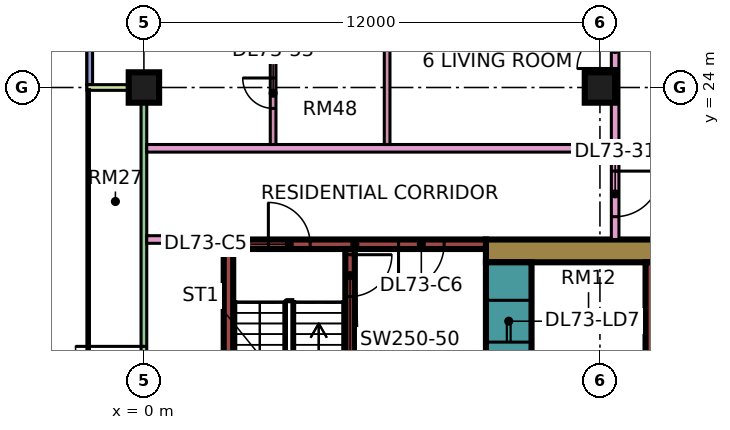
"""IFC4 building model, lengths in metres.
Left out: names, types, materials, properties, quantities, classifications, styles, units other than length and angle.
Written with IfcOpenShell. Run it as: python <this file> out.ifc"""

import sys

from ifc_helpers import new_model, si_unit, direction, frame, frame_2d, origin, origin_2d, place, context, subcontext, project, spatial, rectangle, extrude, element, fill, save


model = new_model("IFC4")
c1 = context("Model", 3, precision=1e-05, world=origin(), true_north=direction((0.0, 1.0)))
c2 = subcontext(c1, "Body", "Model", "MODEL_VIEW")
j1 = project(units=[si_unit("LENGTHUNIT", "METRE"), si_unit("PLANEANGLEUNIT", "RADIAN")], contexts=[c1])
p1 = place(None, origin())
s1 = spatial("IfcSite", under=j1, at=p1, CompositionType="ELEMENT")
p2 = place(p1, origin())
s2 = spatial("IfcBuilding", under=s1, at=p2, CompositionType="ELEMENT")
p3 = place(p2, frame((0.0, 0.0, 310.9)))
s3 = spatial("IfcBuildingStorey", under=s2, at=p3, CompositionType="ELEMENT", Elevation=310.9)
for number, where, z_axis, x_axis in (
    (1, (0.0, 24.0, 0.0), (0.0, 0.0, 1.0), (1.0, 0.0, 0.0)),
    (2, (12.0, 24.0, 0.0), (0.0, 0.0, 1.0), (1.0, 0.0, 0.0)),
):
    element("IfcColumn", number, at=place(p3, frame(where, z_axis=z_axis, x_axis=x_axis)), inside=s3, PredefinedType="COLUMN", context=c2, shape_type="SweptSolid", body=[
        extrude(rectangle(XDim=0.8, YDim=0.8, at=origin_2d()), origin(), (0.0, 0.0, 1.0), 3.75),
    ])
p4 = place(p3, frame((9.0, 19.7, 0.0), z_axis=(0.0, 0.0, 1.0), x_axis=(1.0, 0.0, 0.0)))
e3 = element("IfcWall", 3, at=p4, inside=s3, PredefinedType="SHEAR", context=c2, shape_type="SweptSolid", body=[
    extrude(rectangle(XDim=25.0, YDim=0.6, at=frame_2d((12.5, 0.0))), origin(), (0.0, 0.0, 1.0), 3.75),
])
p5 = place(p4, frame((19.1, 0.0, 0.0)))
e4 = element("IfcOpeningElement", 4, at=p5, cuts=e3, PredefinedType="OPENING", context=c2, shape_type="SweptSolid", body=[
    extrude(rectangle(XDim=1.8, YDim=2.4, at=frame_2d((0.9, 1.2))), frame((0.0, 0.31, 0.0), z_axis=(0.0, -1.0, 0.0), x_axis=(1.0, 0.0, 0.0)), (0.0, 0.0, 1.0), 0.62),
])
p6 = place(p3, frame((9.6, 7.6, 0.0), z_axis=(0.0, 0.0, 1.0), x_axis=(0.0, 1.0, 0.0)))
e5 = element("IfcWall", 5, at=p6, inside=s3, PredefinedType="SHEAR", context=c2, shape_type="SweptSolid", body=[
    extrude(rectangle(XDim=11.8, YDim=1.2, at=frame_2d((5.9, 0.0))), origin(), (0.0, 0.0, 1.0), 3.75),
])
p7 = place(p6, frame((4.275, 0.0, 0.0)))
e6 = element("IfcOpeningElement", 6, at=p7, cuts=e5, PredefinedType="OPENING", context=c2, shape_type="SweptSolid", body=[
    extrude(rectangle(XDim=1.1, YDim=2.2, at=frame_2d((0.55, 1.1))), frame((0.0, 0.61, 0.0), z_axis=(0.0, -1.0, 0.0), x_axis=(1.0, 0.0, 0.0)), (0.0, 0.0, 1.0), 1.22),
])
p8 = place(p6, frame((6.775, 0.0, 0.0)))
e7 = element("IfcOpeningElement", 7, at=p8, cuts=e5, PredefinedType="OPENING", context=c2, shape_type="SweptSolid", body=[
    extrude(rectangle(XDim=1.1, YDim=2.2, at=frame_2d((0.55, 1.1))), frame((0.0, 0.61, 0.0), z_axis=(0.0, -1.0, 0.0), x_axis=(1.0, 0.0, 0.0)), (0.0, 0.0, 1.0), 1.22),
])
p9 = place(p6, frame((9.7, 0.0, 0.0)))
e8 = element("IfcOpeningElement", 8, at=p9, cuts=e5, PredefinedType="OPENING", context=c2, shape_type="SweptSolid", body=[
    extrude(rectangle(XDim=1.1, YDim=2.2, at=frame_2d((0.55, 1.1))), frame((0.0, 0.61, 0.0), z_axis=(0.0, -1.0, 0.0), x_axis=(1.0, 0.0, 0.0)), (0.0, 0.0, 1.0), 1.22),
])
p10 = place(p6, frame((1.95, 0.0, 0.0)))
e9 = element("IfcOpeningElement", 9, at=p10, cuts=e5, PredefinedType="OPENING", context=c2, shape_type="SweptSolid", body=[
    extrude(rectangle(XDim=0.9, YDim=2.1, at=frame_2d((0.45, 1.05))), frame((0.0, 0.61, 0.0), z_axis=(0.0, -1.0, 0.0), x_axis=(1.0, 0.0, 0.0)), (0.0, 0.0, 1.0), 1.22),
])
p11 = place(p3, frame((13.325, 7.6, 0.0), z_axis=(0.0, 0.0, 1.0), x_axis=(0.0, 1.0, 0.0)))
e10 = element("IfcWall", 10, at=p11, inside=s3, PredefinedType="SHEAR", context=c2, shape_type="SweptSolid", body=[
    extrude(rectangle(XDim=11.8, YDim=0.25, at=frame_2d((5.9, 0.0))), origin(), (0.0, 0.0, 1.0), 3.75),
])
p12 = place(p3, frame((2.1, 19.875, 0.0), z_axis=(0.0, 0.0, 1.0), x_axis=(1.0, 0.0, 0.0)))
e11 = element("IfcWall", 11, at=p12, inside=s3, PredefinedType="SHEAR", context=c2, shape_type="SweptSolid", body=[
    extrude(rectangle(XDim=6.9, YDim=0.25, at=frame_2d((3.45, 0.0))), origin(), (0.0, 0.0, 1.0), 3.75),
])
p13 = place(p12, frame((1.175, 0.0, 0.0)))
e12 = element("IfcOpeningElement", 12, at=p13, cuts=e11, PredefinedType="OPENING", context=c2, shape_type="SweptSolid", body=[
    extrude(rectangle(XDim=1.1, YDim=2.2, at=frame_2d((0.55, 1.1))), frame((0.0, 0.135, 0.0), z_axis=(0.0, -1.0, 0.0), x_axis=(1.0, 0.0, 0.0)), (0.0, 0.0, 1.0), 0.27),
])
p14 = place(p12, frame((4.6, 0.0, 0.0)))
e13 = element("IfcOpeningElement", 13, at=p14, cuts=e11, PredefinedType="OPENING", context=c2, shape_type="SweptSolid", body=[
    extrude(rectangle(XDim=1.2, YDim=2.2, at=frame_2d((0.6, 1.1))), frame((0.0, 0.135, 0.0), z_axis=(0.0, -1.0, 0.0), x_axis=(1.0, 0.0, 0.0)), (0.0, 0.0, 1.0), 0.27),
])
p15 = place(p3, frame((2.225, 13.25, 0.0), z_axis=(0.0, 0.0, 1.0), x_axis=(0.0, 1.0, 0.0)))
e14 = element("IfcWall", 14, at=p15, inside=s3, PredefinedType="SHEAR", context=c2, shape_type="SweptSolid", body=[
    extrude(rectangle(XDim=6.5, YDim=0.25, at=frame_2d((3.25, 0.0))), origin(), (0.0, 0.0, 1.0), 3.75),
])
p16 = place(p3, frame((5.425, 13.25, 0.0), z_axis=(0.0, 0.0, 1.0), x_axis=(0.0, 1.0, 0.0)))
e15 = element("IfcWall", 15, at=p16, inside=s3, PredefinedType="SHEAR", context=c2, shape_type="SweptSolid", body=[
    extrude(rectangle(XDim=6.5, YDim=0.25, at=frame_2d((3.25, 0.0))), origin(), (0.0, 0.0, 1.0), 3.75),
])
p17 = place(p16, frame((5.25, 0.0, 0.0)))
e16 = element("IfcOpeningElement", 16, at=p17, cuts=e15, PredefinedType="OPENING", context=c2, shape_type="SweptSolid", body=[
    extrude(rectangle(XDim=1.1, YDim=2.2, at=frame_2d((0.55, 1.1))), frame((0.0, 0.135, 0.0), z_axis=(0.0, -1.0, 0.0), x_axis=(1.0, 0.0, 0.0)), (0.0, 0.0, 1.0), 0.27),
])
p18 = place(p3, frame((-1.425, 35.925, 0.0), z_axis=(0.0, 0.0, 1.0), x_axis=(0.0, -1.0, 0.0)))
e17 = element("IfcWall", 17, at=p18, inside=s3, PredefinedType="SOLIDWALL", context=c2, shape_type="SweptSolid", body=[
    extrude(rectangle(XDim=11.85, YDim=0.15, at=frame_2d((5.925, 0.0))), origin(), (0.0, 0.0, 1.0), 3.35),
])
p19 = place(p18, frame((0.562, 0.0, 0.45)))
e18 = element("IfcOpeningElement", 18, at=p19, cuts=e17, PredefinedType="OPENING", context=c2, shape_type="SweptSolid", body=[
    extrude(rectangle(XDim=1.8, YDim=2.4, at=frame_2d((0.9, 1.2))), frame((0.0, 0.085, 0.0), z_axis=(0.0, -1.0, 0.0), x_axis=(1.0, 0.0, 0.0)), (0.0, 0.0, 1.0), 0.17),
])
p20 = place(p18, frame((3.525, 0.0, 0.45)))
e19 = element("IfcOpeningElement", 19, at=p20, cuts=e17, PredefinedType="OPENING", context=c2, shape_type="SweptSolid", body=[
    extrude(rectangle(XDim=1.8, YDim=2.4, at=frame_2d((0.9, 1.2))), frame((0.0, 0.085, 0.0), z_axis=(0.0, -1.0, 0.0), x_axis=(1.0, 0.0, 0.0)), (0.0, 0.0, 1.0), 0.17),
])
p21 = place(p18, frame((7.387, 0.0, 0.45)))
e20 = element("IfcOpeningElement", 20, at=p21, cuts=e17, PredefinedType="OPENING", context=c2, shape_type="SweptSolid", body=[
    extrude(rectangle(XDim=3.0, YDim=2.4, at=frame_2d((1.5, 1.2))), frame((0.0, 0.085, 0.0), z_axis=(0.0, -1.0, 0.0), x_axis=(1.0, 0.0, 0.0)), (0.0, 0.0, 1.0), 0.17),
])
p22 = place(p3, frame((0.0, 23.925, 0.0), z_axis=(0.0, 0.0, 1.0), x_axis=(0.0, -1.0, 0.0)))
e21 = element("IfcWall", 21, at=p22, inside=s3, PredefinedType="SOLIDWALL", context=c2, shape_type="SweptSolid", body=[
    extrude(rectangle(XDim=11.35, YDim=0.15, at=frame_2d((5.675, 0.0))), origin(), (0.0, 0.0, 1.0), 3.35),
])
p23 = place(p22, frame((6.738, 0.0, 0.0)))
e22 = element("IfcOpeningElement", 22, at=p23, cuts=e21, PredefinedType="OPENING", context=c2, shape_type="SweptSolid", body=[
    extrude(rectangle(XDim=1.8, YDim=2.4, at=frame_2d((0.9, 1.2))), frame((0.0, 0.085, 0.0), z_axis=(0.0, -1.0, 0.0), x_axis=(1.0, 0.0, 0.0)), (0.0, 0.0, 1.0), 0.17),
])
p24 = place(p3, frame((-1.5, 24.0, 0.0), z_axis=(0.0, 0.0, 1.0), x_axis=(1.0, 0.0, 0.0)))
e23 = element("IfcWall", 23, at=p24, inside=s3, PredefinedType="SOLIDWALL", context=c2, shape_type="SweptSolid", body=[
    extrude(rectangle(XDim=1.5, YDim=0.15, at=frame_2d((0.75, 0.0))), origin(), (0.0, 0.0, 1.0), 3.35),
])
p25 = place(p3, frame((0.074, 20.0, 0.0), z_axis=(0.0, 0.0, 1.0), x_axis=(1.0, 0.0, 0.0)))
e24 = element("IfcWall", 24, at=p25, inside=s3, PredefinedType="PARTITIONING", context=c2, shape_type="SweptSolid", body=[
    extrude(rectangle(XDim=2.026, YDim=0.2, at=frame_2d((1.013, 0.0))), origin(), (0.0, 0.0, 1.0), 3.35),
])
p26 = place(p3, frame((0.074, 22.4, 0.0), z_axis=(0.0, 0.0, 1.0), x_axis=(1.0, 0.0, 0.0)))
e25 = element("IfcWall", 25, at=p26, inside=s3, PredefinedType="PARTITIONING", context=c2, shape_type="SweptSolid", body=[
    extrude(rectangle(XDim=12.226, YDim=0.2, at=frame_2d((6.113, 0.0))), origin(), (0.0, 0.0, 1.0), 3.35),
])
p27 = place(p3, frame((3.4, 22.5, 0.0), z_axis=(0.0, 0.0, 1.0), x_axis=(0.0, 1.0, 0.0)))
e26 = element("IfcWall", 26, at=p27, inside=s3, PredefinedType="PARTITIONING", context=c2, shape_type="SweptSolid", body=[
    extrude(rectangle(XDim=2.825, YDim=0.15, at=frame_2d((1.413, 0.0))), origin(), (0.0, 0.0, 1.0), 3.35),
])
p28 = place(p27, frame((0.95, 0.0, 0.0)))
e27 = element("IfcOpeningElement", 27, at=p28, cuts=e26, PredefinedType="OPENING", context=c2, shape_type="SweptSolid", body=[
    extrude(rectangle(XDim=0.8, YDim=2.1, at=frame_2d((0.4, 1.05))), frame((0.0, 0.085, 0.0), z_axis=(0.0, -1.0, 0.0), x_axis=(1.0, 0.0, 0.0)), (0.0, 0.0, 1.0), 0.17),
])
p29 = place(p3, frame((6.4, 22.5, 0.0), z_axis=(0.0, 0.0, 1.0), x_axis=(0.0, 1.0, 0.0)))
e28 = element("IfcWall", 28, at=p29, inside=s3, PredefinedType="PARTITIONING", context=c2, shape_type="SweptSolid", body=[
    extrude(rectangle(XDim=7.55, YDim=0.15, at=frame_2d((3.775, 0.0))), origin(), (0.0, 0.0, 1.0), 3.35),
])
p30 = place(p3, frame((12.4, 20.0, 0.0), z_axis=(0.0, 0.0, 1.0), x_axis=(0.0, 1.0, 0.0)))
e29 = element("IfcWall", 29, at=p30, inside=s3, PredefinedType="PARTITIONING", context=c2, shape_type="SweptSolid", body=[
    extrude(rectangle(XDim=33.926, YDim=0.2, at=frame_2d((16.963, 0.0))), origin(), (0.0, 0.0, 1.0), 3.35),
])
p31 = place(p30, frame((31.8, 0.0, 0.0)))
e30 = element("IfcOpeningElement", 30, at=p31, cuts=e29, PredefinedType="OPENING", context=c2, shape_type="SweptSolid", body=[
    extrude(rectangle(XDim=1.0, YDim=2.1, at=frame_2d((0.5, 1.05))), frame((0.0, 0.11, 0.0), z_axis=(0.0, -1.0, 0.0), x_axis=(1.0, 0.0, 0.0)), (0.0, 0.0, 1.0), 0.22),
])
p32 = place(p30, frame((0.6, 0.0, 0.0)))
e31 = element("IfcOpeningElement", 31, at=p32, cuts=e29, PredefinedType="OPENING", context=c2, shape_type="SweptSolid", body=[
    extrude(rectangle(XDim=1.2, YDim=2.1, at=frame_2d((0.6, 1.05))), frame((0.0, 0.11, 0.0), z_axis=(0.0, -1.0, 0.0), x_axis=(1.0, 0.0, 0.0)), (0.0, 0.0, 1.0), 0.22),
])
p33 = place(p30, frame((4.5, 0.0, 0.0)))
e32 = element("IfcOpeningElement", 32, at=p33, cuts=e29, PredefinedType="OPENING", context=c2, shape_type="SweptSolid", body=[
    extrude(rectangle(XDim=1.0, YDim=2.1, at=frame_2d((0.5, 1.05))), frame((0.0, 0.11, 0.0), z_axis=(0.0, -1.0, 0.0), x_axis=(1.0, 0.0, 0.0)), (0.0, 0.0, 1.0), 0.22),
])
p34 = place(p23, frame((1.8, 0.0, 0.0), z_axis=(0.0, 0.0, 1.0), x_axis=(-1.0, 0.0, 0.0)))
e33 = element("IfcDoor", 33, at=p34, inside=s3, OperationType="DOUBLE_DOOR_SINGLE_SWING", PredefinedType="DOOR", context=c2, shape_type="SweptSolid", body=[
    extrude(rectangle(XDim=1.8, YDim=2.4, at=frame_2d((0.9, 1.2))), frame((0.0, 0.025, 0.0), z_axis=(0.0, -1.0, 0.0), x_axis=(1.0, 0.0, 0.0)), (0.0, 0.0, 1.0), 0.05),
])
fill(e22, e33)
p35 = place(p9, origin())
e34 = element("IfcDoor", 34, at=p35, inside=s3, OperationType="DOUBLE_DOOR_SLIDING", PredefinedType="DOOR", context=c2, shape_type="SweptSolid", body=[
    extrude(rectangle(XDim=1.1, YDim=2.2, at=frame_2d((0.55, 1.1))), frame((0.0, 0.025, 0.0), z_axis=(0.0, -1.0, 0.0), x_axis=(1.0, 0.0, 0.0)), (0.0, 0.0, 1.0), 0.05),
])
fill(e8, e34)
p36 = place(p17, origin())
e35 = element("IfcDoor", 35, at=p36, inside=s3, OperationType="SINGLE_SWING_RIGHT", PredefinedType="DOOR", context=c2, shape_type="SweptSolid", body=[
    extrude(rectangle(XDim=1.1, YDim=2.2, at=frame_2d((0.55, 1.1))), frame((0.0, 0.025, 0.0), z_axis=(0.0, -1.0, 0.0), x_axis=(1.0, 0.0, 0.0)), (0.0, 0.0, 1.0), 0.05),
])
fill(e16, e35)
p37 = place(p13, origin())
e36 = element("IfcDoor", 36, at=p37, inside=s3, OperationType="SINGLE_SWING_LEFT", PredefinedType="DOOR", context=c2, shape_type="SweptSolid", body=[
    extrude(rectangle(XDim=1.1, YDim=2.2, at=frame_2d((0.55, 1.1))), frame((0.0, 0.025, 0.0), z_axis=(0.0, -1.0, 0.0), x_axis=(1.0, 0.0, 0.0)), (0.0, 0.0, 1.0), 0.05),
])
fill(e12, e36)
p38 = place(p14, frame((1.2, 0.0, 0.0), z_axis=(0.0, 0.0, 1.0), x_axis=(-1.0, 0.0, 0.0)))
e37 = element("IfcDoor", 37, at=p38, inside=s3, OperationType="SINGLE_SWING_LEFT", PredefinedType="DOOR", context=c2, shape_type="SweptSolid", body=[
    extrude(rectangle(XDim=1.2, YDim=2.2, at=frame_2d((0.6, 1.1))), frame((0.0, 0.025, 0.0), z_axis=(0.0, -1.0, 0.0), x_axis=(1.0, 0.0, 0.0)), (0.0, 0.0, 1.0), 0.05),
])
fill(e13, e37)
p39 = place(p32, origin())
e38 = element("IfcDoor", 38, at=p39, inside=s3, OperationType="SINGLE_SWING_RIGHT", PredefinedType="DOOR", context=c2, shape_type="SweptSolid", body=[
    extrude(rectangle(XDim=1.2, YDim=2.1, at=frame_2d((0.6, 1.05))), frame((0.0, 0.025, 0.0), z_axis=(0.0, -1.0, 0.0), x_axis=(1.0, 0.0, 0.0)), (0.0, 0.0, 1.0), 0.05),
])
fill(e31, e38)
p40 = place(p28, frame((0.8, 0.0, 0.0), z_axis=(0.0, 0.0, 1.0), x_axis=(-1.0, 0.0, 0.0)))
e39 = element("IfcDoor", 39, at=p40, inside=s3, OperationType="SINGLE_SWING_RIGHT", PredefinedType="DOOR", context=c2, shape_type="SweptSolid", body=[
    extrude(rectangle(XDim=0.8, YDim=2.1, at=frame_2d((0.4, 1.05))), frame((0.0, 0.025, 0.0), z_axis=(0.0, -1.0, 0.0), x_axis=(1.0, 0.0, 0.0)), (0.0, 0.0, 1.0), 0.05),
])
fill(e27, e39)
p41 = place(p33, origin())
e40 = element("IfcDoor", 40, at=p41, inside=s3, OperationType="SINGLE_SWING_LEFT", PredefinedType="DOOR", context=c2, shape_type="SweptSolid", body=[
    extrude(rectangle(XDim=1.0, YDim=2.1, at=frame_2d((0.5, 1.05))), frame((0.0, 0.025, 0.0), z_axis=(0.0, -1.0, 0.0), x_axis=(1.0, 0.0, 0.0)), (0.0, 0.0, 1.0), 0.05),
])
fill(e32, e40)
save(model, sys.argv[1])
